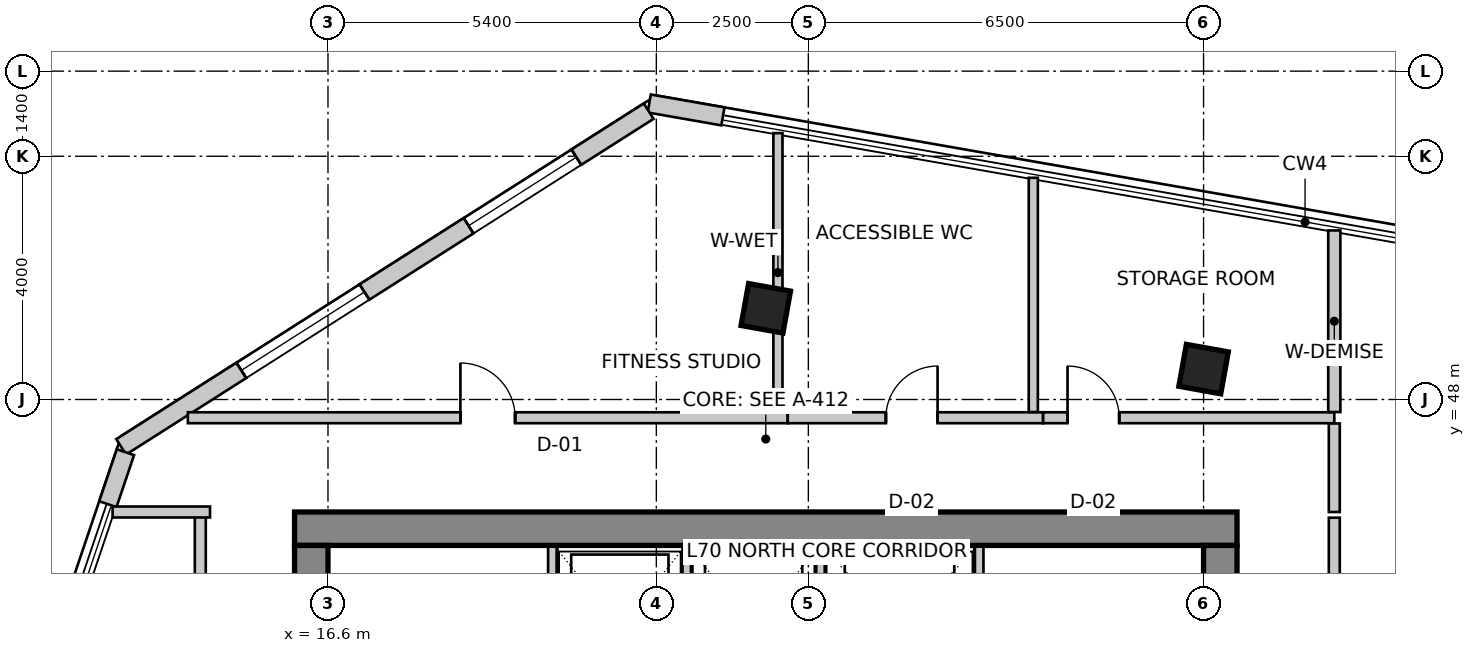
"""IFC4 building model, lengths in metres.
Left out: names, types, materials, properties, quantities, classifications, styles, units other than length and angle.
Written with IfcOpenShell. Run it as: python <this file> out.ifc"""

import sys

from ifc_helpers import new_model, si_unit, direction, frame, frame_2d, origin, origin_2d, place, context, subcontext, project, spatial, rectangle, extrude, source, transform, mapped, element, fill, save


model = new_model("IFC4")
c1 = context("Model", 3, precision=1e-05, world=origin(), true_north=direction((0.0, 1.0)))
c2 = subcontext(c1, "Body", "Model", "MODEL_VIEW")
j1 = project(units=[si_unit("LENGTHUNIT", "METRE"), si_unit("PLANEANGLEUNIT", "RADIAN")], contexts=[c1])
p1 = place(None, origin())
s1 = spatial("IfcSite", under=j1, at=p1, CompositionType="ELEMENT")
p2 = place(p1, origin())
s2 = spatial("IfcBuilding", under=s1, at=p2, CompositionType="ELEMENT")
p3 = place(p2, frame((0.0, 0.0, 274.5)))
s3 = spatial("IfcBuildingStorey", under=s2, at=p3, CompositionType="ELEMENT", Elevation=274.5)
p4 = place(p3, frame((16.05, 45.875, 0.0), z_axis=(0.0, 0.0, 1.0), x_axis=(1.0, 0.0, 0.0)))
e1 = element("IfcWall", 1, at=p4, inside=s3, PredefinedType="SHEAR", context=c2, shape_type="SweptSolid", body=[
    extrude(rectangle(XDim=15.5, YDim=0.55, at=frame_2d((7.75, 0.0))), origin(), (0.0, 0.0, 1.0), 3.6),
])
p5 = place(p3, frame((16.325, 34.2, 0.0), z_axis=(0.0, 0.0, 1.0), x_axis=(0.0, 1.0, 0.0)))
e2 = element("IfcWall", 2, at=p5, inside=s3, PredefinedType="SHEAR", context=c2, shape_type="SweptSolid", body=[
    extrude(rectangle(XDim=11.4, YDim=0.55, at=frame_2d((5.7, 0.0))), origin(), (0.0, 0.0, 1.0), 3.6),
])
m1 = source(origin(), c2, "Body", "SweptSolid", [
    extrude(rectangle(XDim=1.1, YDim=2.15, at=frame_2d((0.55, 1.075))), frame((0.0, 0.285, 0.0), z_axis=(0.0, -1.0, 0.0), x_axis=(1.0, 0.0, 0.0)), (0.0, 0.0, 1.0), 0.57),
])
p6 = place(p5, frame((7.15, 0.0, 0.0)))
e3 = element("IfcOpeningElement", 3, at=p6, cuts=e2, PredefinedType="OPENING", context=c2, shape_type="MappedRepresentation", body=[
    mapped(m1, transform((0.0, 0.0, 0.0), scale=1.0)),
])
p7 = place(p3, frame((31.275, 34.2, 0.0), z_axis=(0.0, 0.0, 1.0), x_axis=(0.0, 1.0, 0.0)))
e4 = element("IfcWall", 4, at=p7, inside=s3, PredefinedType="SHEAR", context=c2, shape_type="SweptSolid", body=[
    extrude(rectangle(XDim=11.4, YDim=0.55, at=frame_2d((5.7, 0.0))), origin(), (0.0, 0.0, 1.0), 3.6),
])
p8 = place(p7, frame((7.35, 0.0, 0.0)))
e5 = element("IfcOpeningElement", 5, at=p8, cuts=e4, PredefinedType="OPENING", context=c2, shape_type="MappedRepresentation", body=[
    mapped(m1, transform((0.0, 0.0, 0.0), scale=1.0)),
])
m2 = source(origin(), c2, "Body", "SweptSolid", [
    extrude(rectangle(XDim=0.7, YDim=0.7, at=origin_2d()), origin(), (0.0, 0.0, 1.0), 3.6),
])
for number, where, z_axis, x_axis in (
    (6, (23.8, 49.5, 0.0), (0.0, 0.0, 1.0), (0.984, -0.177, 0.0)),
    (7, (31.0, 48.5, 0.0), (0.0, 0.0, 1.0), (0.984, -0.177, 0.0)),
):
    element("IfcColumn", number, at=place(p3, frame(where, z_axis=z_axis, x_axis=x_axis)), inside=s3, PredefinedType="COLUMN", context=c2, shape_type="MappedRepresentation", body=[
        mapped(m2, transform((0.0, 0.0, 0.0), scale=1.0)),
    ])
p9 = place(p3, frame((23.095, 52.656, 0.0), z_axis=(0.0, 0.0, 1.0), x_axis=(-0.985008549623, 0.172505527937, 0.0)))
e8 = element("IfcWall", 8, at=p9, inside=s3, PredefinedType="SOLIDWALL", context=c2, shape_type="SweptSolid", body=[
    extrude(rectangle(XDim=1.23, YDim=0.3, at=frame_2d((0.615, 0.0))), origin(), (0.0, 0.0, 1.0), 3.35),
])
p10 = place(p3, frame((21.874, 52.742, 0.0), z_axis=(0.0, 0.0, 1.0), x_axis=(-0.84365659959, -0.536883173482, 0.0)))
e9 = element("IfcWall", 9, at=p10, inside=s3, PredefinedType="SOLIDWALL", context=c2, shape_type="SweptSolid", body=[
    extrude(rectangle(XDim=10.283, YDim=0.3, at=frame_2d((5.142, 0.0))), origin(), (0.0, 0.0, 1.0), 3.35),
])
m3 = source(origin(), c2, "Body", "SweptSolid", [
    extrude(rectangle(XDim=2.1, YDim=2.0, at=frame_2d((1.05, 1.0))), frame((0.0, 0.16, 0.0), z_axis=(0.0, -1.0, 0.0), x_axis=(1.0, 0.0, 0.0)), (0.0, 0.0, 1.0), 0.32),
])
p11 = place(p10, frame((1.41, 0.0, 0.85)))
e10 = element("IfcOpeningElement", 10, at=p11, cuts=e9, PredefinedType="OPENING", context=c2, shape_type="MappedRepresentation", body=[
    mapped(m3, transform((0.0, 0.0, 0.0), scale=1.0)),
])
m4 = source(origin(), c2, "Body", "SweptSolid", [
    extrude(rectangle(XDim=2.4, YDim=2.2, at=frame_2d((1.2, 1.1))), frame((0.0, 0.16, 0.0), z_axis=(0.0, -1.0, 0.0), x_axis=(1.0, 0.0, 0.0)), (0.0, 0.0, 1.0), 0.32),
])
p12 = place(p10, frame((5.54, 0.0, 0.85)))
e11 = element("IfcOpeningElement", 11, at=p12, cuts=e9, PredefinedType="OPENING", context=c2, shape_type="MappedRepresentation", body=[
    mapped(m4, transform((0.0, 0.0, 0.0), scale=1.0)),
])
p13 = place(p3, frame((13.269, 47.134, 0.0), z_axis=(0.0, 0.0, 1.0), x_axis=(-0.31995770778, -0.947431826166, 0.0)))
e12 = element("IfcWall", 12, at=p13, inside=s3, PredefinedType="SOLIDWALL", context=c2, shape_type="SweptSolid", body=[
    extrude(rectangle(XDim=0.903, YDim=0.3, at=frame_2d((0.451, 0.0))), origin(), (0.0, 0.0, 1.0), 3.35),
])
for number, where, z_axis, x_axis in (
    (13, (20.29, 43.28, 0.0), (0.0, 0.0, 1.0), (0.0, 1.0, 0.0)),
    (14, (27.31, 43.28, 0.0), (0.0, 0.0, 1.0), (0.0, 1.0, 0.0)),
):
    element("IfcWall", number, at=place(p3, frame(where, z_axis=z_axis, x_axis=x_axis)), inside=s3, PredefinedType="SOLIDWALL", context=c2, shape_type="SweptSolid", body=[
        extrude(rectangle(XDim=2.3, YDim=0.14, at=frame_2d((1.15, 0.0))), origin(), (0.0, 0.0, 1.0), 3.35),
    ])
for number, where, z_axis, x_axis in (
    (15, (22.5, 43.02, 0.0), (0.0, 0.0, 1.0), (0.0, 1.0, 0.0)),
    (16, (24.7, 43.02, 0.0), (0.0, 0.0, 1.0), (0.0, 1.0, 0.0)),
):
    element("IfcWall", number, at=place(p3, frame(where, z_axis=z_axis, x_axis=x_axis)), inside=s3, PredefinedType="SOLIDWALL", context=c2, shape_type="SweptSolid", body=[
        extrude(rectangle(XDim=2.56, YDim=0.14, at=frame_2d((1.28, 0.0))), origin(), (0.0, 0.0, 1.0), 3.35),
    ])
p14 = place(p3, frame((14.5, 33.744, 0.0), z_axis=(0.0, 0.0, 1.0), x_axis=(0.0, 1.0, 0.0)))
e17 = element("IfcWall", 17, at=p14, inside=s3, PredefinedType="PARTITIONING", context=c2, shape_type="SweptSolid", body=[
    extrude(rectangle(XDim=12.406, YDim=0.18, at=frame_2d((6.203, 0.0))), origin(), (0.0, 0.0, 1.0), 3.35),
])
m5 = source(origin(), c2, "Body", "SweptSolid", [
    extrude(rectangle(XDim=0.9, YDim=2.15, at=frame_2d((0.45, 1.075))), frame((0.0, 0.1, 0.0), z_axis=(0.0, -1.0, 0.0), x_axis=(1.0, 0.0, 0.0)), (0.0, 0.0, 1.0), 0.2),
])
p15 = place(p14, frame((4.37, 0.0, 0.0)))
e18 = element("IfcOpeningElement", 18, at=p15, cuts=e17, PredefinedType="OPENING", context=c2, shape_type="MappedRepresentation", body=[
    mapped(m5, transform((0.0, 0.0, 0.0), scale=1.0)),
])
p16 = place(p3, frame((14.66, 46.15, 0.0), z_axis=(0.0, 0.0, 1.0), x_axis=(-1.0, 0.0, 0.0)))
e19 = element("IfcWall", 19, at=p16, inside=s3, PredefinedType="PARTITIONING", context=c2, shape_type="SweptSolid", body=[
    extrude(rectangle(XDim=1.602, YDim=0.18, at=frame_2d((0.801, 0.0))), origin(), (0.0, 0.0, 1.0), 3.35),
])
p17 = place(p3, frame((14.295, 47.7, 0.0), z_axis=(0.0, 0.0, 1.0), x_axis=(1.0, 0.0, 0.0)))
e20 = element("IfcWall", 20, at=p17, inside=s3, PredefinedType="PARTITIONING", context=c2, shape_type="SweptSolid", body=[
    extrude(rectangle(XDim=9.865, YDim=0.18, at=frame_2d((4.932, 0.0))), origin(), (0.0, 0.0, 1.0), 3.019),
])
p18 = place(p17, frame((4.482, 0.0, 0.0)))
e21 = element("IfcOpeningElement", 21, at=p18, cuts=e20, PredefinedType="OPENING", context=c2, shape_type="MappedRepresentation", body=[
    mapped(m5, transform((0.0, 0.0, 0.0), scale=1.0)),
])
p19 = place(p3, frame((24.162, 47.7, 0.0), z_axis=(0.0, 0.0, 1.0), x_axis=(1.0, 0.0, 0.0)))
e22 = element("IfcWall", 22, at=p19, inside=s3, PredefinedType="PARTITIONING", context=c2, shape_type="SweptSolid", body=[
    extrude(rectangle(XDim=4.198, YDim=0.18, at=frame_2d((2.099, 0.0))), origin(), (0.0, 0.0, 1.0), 3.35),
])
m6 = source(origin(), c2, "Body", "SweptSolid", [
    extrude(rectangle(XDim=0.85, YDim=2.15, at=frame_2d((0.425, 1.075))), frame((0.0, 0.1, 0.0), z_axis=(0.0, -1.0, 0.0), x_axis=(1.0, 0.0, 0.0)), (0.0, 0.0, 1.0), 0.2),
])
p20 = place(p19, frame((1.613, 0.0, 0.0)))
e23 = element("IfcOpeningElement", 23, at=p20, cuts=e22, PredefinedType="OPENING", context=c2, shape_type="MappedRepresentation", body=[
    mapped(m6, transform((0.0, 0.0, 0.0), scale=1.0)),
])
p21 = place(p3, frame((28.362, 47.7, 0.0), z_axis=(0.0, 0.0, 1.0), x_axis=(1.0, 0.0, 0.0)))
e24 = element("IfcWall", 24, at=p21, inside=s3, PredefinedType="PARTITIONING", context=c2, shape_type="SweptSolid", body=[
    extrude(rectangle(XDim=4.788, YDim=0.18, at=frame_2d((2.394, 0.0))), origin(), (0.0, 0.0, 1.0), 2.879),
])
p22 = place(p21, frame((0.401, 0.0, 0.0)))
e25 = element("IfcOpeningElement", 25, at=p22, cuts=e24, PredefinedType="OPENING", context=c2, shape_type="MappedRepresentation", body=[
    mapped(m6, transform((0.0, 0.0, 0.0), scale=1.0)),
])
p23 = place(p3, frame((33.15, 47.606, 0.0), z_axis=(0.0, 0.0, 1.0), x_axis=(0.0, -1.0, 0.0)))
e26 = element("IfcWall", 26, at=p23, inside=s3, PredefinedType="PARTITIONING", context=c2, shape_type="SweptSolid", body=[
    extrude(rectangle(XDim=1.456, YDim=0.18, at=frame_2d((0.728, 0.0))), origin(), (0.0, 0.0, 1.0), 3.35),
])
p24 = place(p3, frame((33.15, 46.056, 0.0), z_axis=(0.0, 0.0, 1.0), x_axis=(0.0, -1.0, 0.0)))
e27 = element("IfcWall", 27, at=p24, inside=s3, PredefinedType="PARTITIONING", context=c2, shape_type="SweptSolid", body=[
    extrude(rectangle(XDim=4.636, YDim=0.18, at=frame_2d((2.318, 0.0))), origin(), (0.0, 0.0, 1.0), 2.879),
])
p25 = place(p24, frame((1.868, 0.0, 0.0)))
e28 = element("IfcOpeningElement", 28, at=p25, cuts=e27, PredefinedType="OPENING", context=c2, shape_type="MappedRepresentation", body=[
    mapped(m5, transform((0.0, 0.0, 0.0), scale=1.0)),
])
p26 = place(p3, frame((24.0, 52.381, 0.0), z_axis=(0.0, 0.0, 1.0), x_axis=(0.0, -1.0, 0.0)))
e29 = element("IfcWall", 29, at=p26, inside=s3, PredefinedType="PARTITIONING", context=c2, shape_type="SweptSolid", body=[
    extrude(rectangle(XDim=4.587, YDim=0.15, at=frame_2d((2.293, 0.0))), origin(), (0.0, 0.0, 1.0), 2.642),
])
p27 = place(p3, frame((28.2, 51.646, 0.0), z_axis=(0.0, 0.0, 1.0), x_axis=(0.0, -1.0, 0.0)))
e30 = element("IfcWall", 30, at=p27, inside=s3, PredefinedType="PARTITIONING", context=c2, shape_type="SweptSolid", body=[
    extrude(rectangle(XDim=3.852, YDim=0.15, at=frame_2d((1.926, 0.0))), origin(), (0.0, 0.0, 1.0), 2.642),
])
p28 = place(p3, frame((33.15, 50.78, 0.0), z_axis=(0.0, 0.0, 1.0), x_axis=(0.0, -1.0, 0.0)))
e31 = element("IfcWall", 31, at=p28, inside=s3, PredefinedType="PARTITIONING", context=c2, shape_type="SweptSolid", body=[
    extrude(rectangle(XDim=2.986, YDim=0.2, at=frame_2d((1.493, 0.0))), origin(), (0.0, 0.0, 1.0), 2.642),
])
m7 = source(origin(), c2, "Body", "SweptSolid", [
    extrude(rectangle(XDim=2.1, YDim=2.0, at=frame_2d((1.05, 1.0))), frame((0.0, -0.015, 0.0), z_axis=(0.0, -1.0, 0.0), x_axis=(1.0, 0.0, 0.0)), (0.0, 0.0, 1.0), 0.06),
])
p29 = place(p11, origin())
e32 = element("IfcWindow", 32, at=p29, inside=s3, PartitioningType="SINGLE_PANEL", PredefinedType="WINDOW", context=c2, shape_type="MappedRepresentation", body=[
    mapped(m7, transform((0.0, 0.0, 0.0), scale=1.0)),
])
fill(e10, e32)
m8 = source(origin(), c2, "Body", "SweptSolid", [
    extrude(rectangle(XDim=2.4, YDim=2.2, at=frame_2d((1.2, 1.1))), frame((0.0, -0.015, 0.0), z_axis=(0.0, -1.0, 0.0), x_axis=(1.0, 0.0, 0.0)), (0.0, 0.0, 1.0), 0.06),
])
p30 = place(p12, origin())
e33 = element("IfcWindow", 33, at=p30, inside=s3, PartitioningType="SINGLE_PANEL", PredefinedType="WINDOW", context=c2, shape_type="MappedRepresentation", body=[
    mapped(m8, transform((0.0, 0.0, 0.0), scale=1.0)),
])
fill(e11, e33)
m9 = source(origin(), c2, "Body", "SweptSolid", [
    extrude(rectangle(XDim=0.9, YDim=2.15, at=frame_2d((0.45, 1.075))), frame((0.0, 0.025, 0.0), z_axis=(0.0, -1.0, 0.0), x_axis=(1.0, 0.0, 0.0)), (0.0, 0.0, 1.0), 0.05),
])
p31 = place(p18, origin())
e34 = element("IfcDoor", 34, at=p31, inside=s3, OperationType="SINGLE_SWING_LEFT", PredefinedType="DOOR", context=c2, shape_type="MappedRepresentation", body=[
    mapped(m9, transform((0.0, 0.0, 0.0), scale=1.0)),
])
fill(e21, e34)
m10 = source(origin(), c2, "Body", "SweptSolid", [
    extrude(rectangle(XDim=0.85, YDim=2.15, at=frame_2d((0.425, 1.075))), frame((0.0, 0.025, 0.0), z_axis=(0.0, -1.0, 0.0), x_axis=(1.0, 0.0, 0.0)), (0.0, 0.0, 1.0), 0.05),
])
p32 = place(p20, origin())
e35 = element("IfcDoor", 35, at=p32, inside=s3, OperationType="SINGLE_SWING_RIGHT", PredefinedType="DOOR", context=c2, shape_type="MappedRepresentation", body=[
    mapped(m10, transform((0.0, 0.0, 0.0), scale=1.0)),
])
fill(e23, e35)
p33 = place(p22, origin())
e36 = element("IfcDoor", 36, at=p33, inside=s3, OperationType="SINGLE_SWING_LEFT", PredefinedType="DOOR", context=c2, shape_type="MappedRepresentation", body=[
    mapped(m10, transform((0.0, 0.0, 0.0), scale=1.0)),
])
fill(e25, e36)
save(model, sys.argv[1])
